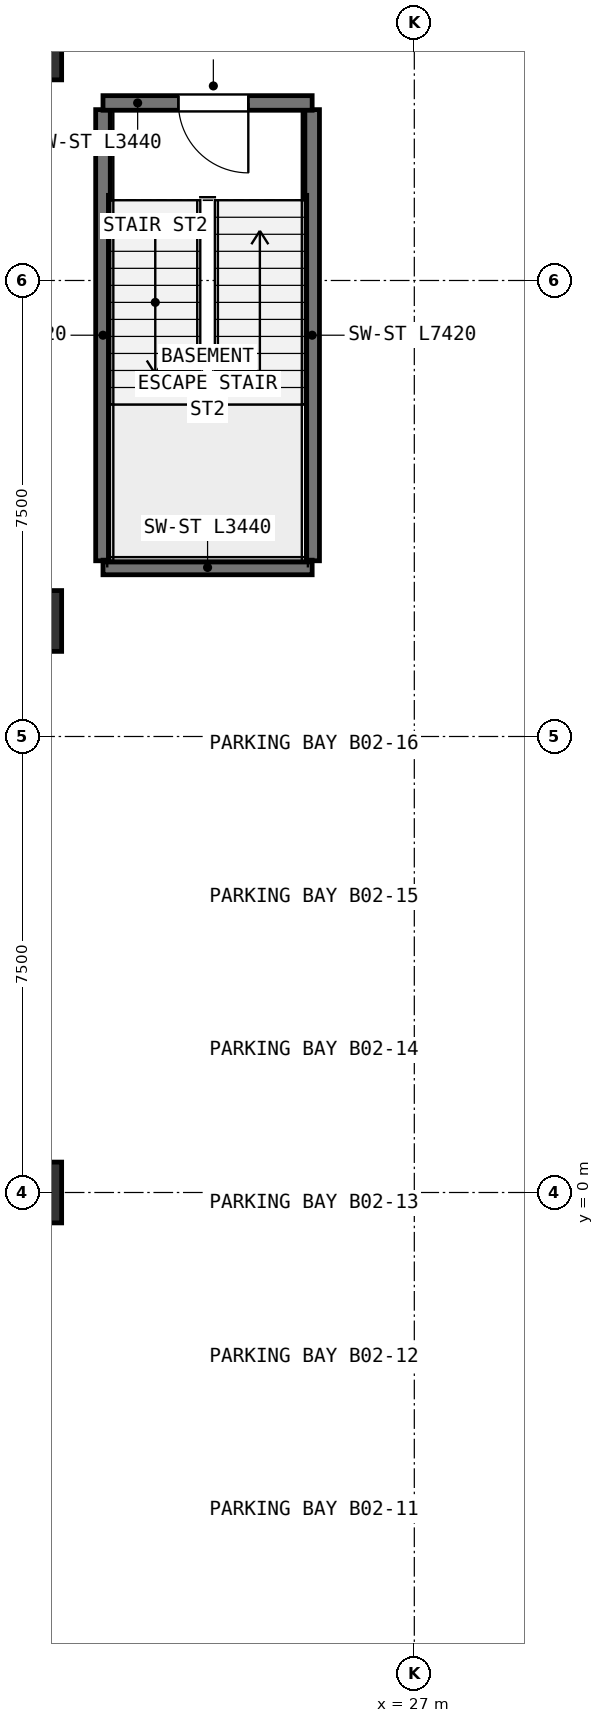
"""IFC4 building model, lengths in metres.
Left out: names, types, materials, properties, quantities, classifications, styles, units other than length and angle.
Written with IfcOpenShell. Run it as: python <this file> out.ifc"""

import sys

from ifc_helpers import new_model, si_unit, direction, frame, frame_2d, origin, origin_2d, place, context, subcontext, project, spatial, rectangle, extrude, element, fill, save


model = new_model("IFC4")
c1 = context("Model", 3, precision=1e-05, world=origin(), true_north=direction((0.0, 1.0)))
c2 = subcontext(c1, "Body", "Model", "MODEL_VIEW")
j1 = project(units=[si_unit("LENGTHUNIT", "METRE"), si_unit("PLANEANGLEUNIT", "RADIAN")], contexts=[c1])
p1 = place(None, origin())
s1 = spatial("IfcSite", under=j1, at=p1, CompositionType="ELEMENT")
p2 = place(p1, origin())
s2 = spatial("IfcBuilding", under=s1, at=p2, CompositionType="ELEMENT")
p3 = place(p2, frame((0.0, 0.0, -9.0)))
s3 = spatial("IfcBuildingStorey", under=s2, at=p3, CompositionType="ELEMENT", Elevation=-9.0)
p4 = place(p3, frame((20.35, -8.429, 0.0), z_axis=(0.0, 0.0, 1.0), x_axis=(-0.923879532511, 0.382683432365, 0.0)))
e1 = element("IfcColumn", 1, at=p4, inside=s3, PredefinedType="COLUMN", context=c2, shape_type="SweptSolid", body=[
    extrude(rectangle(XDim=1.8, YDim=2.2, at=origin_2d()), origin(), (0.0, 0.0, 1.0), 4.5),
])
for number, where, z_axis, x_axis in (
    (2, (20.8, 0.0, 0.0), (0.0, 0.0, 1.0), (1.0, 0.0, 0.0)),
    (3, (20.8, 9.4, 0.0), (0.0, 0.0, 1.0), (1.0, 0.0, 0.0)),
    (4, (20.8, 18.8, 0.0), (0.0, 0.0, 1.0), (1.0, 0.0, 0.0)),
):
    element("IfcColumn", number, at=place(p3, frame(where, z_axis=z_axis, x_axis=x_axis)), inside=s3, PredefinedType="COLUMN", context=c2, shape_type="SweptSolid", body=[
        extrude(rectangle(XDim=0.8, YDim=1.0, at=origin_2d()), origin(), (0.0, 0.0, 1.0), 4.5),
    ])
for number, where, z_axis, x_axis in (
    (5, (21.88, 10.39, 0.0), (0.0, 0.0, 1.0), (0.0, 1.0, 0.0)),
    (6, (25.32, 10.39, 0.0), (0.0, 0.0, 1.0), (0.0, 1.0, 0.0)),
):
    element("IfcWall", number, at=place(p3, frame(where, z_axis=z_axis, x_axis=x_axis)), inside=s3, PredefinedType="SHEAR", context=c2, shape_type="SweptSolid", body=[
        extrude(rectangle(XDim=7.42, YDim=0.24, at=frame_2d((3.71, 0.0))), origin(), (0.0, 0.0, 1.0), 4.2),
    ])
p5 = place(p3, frame((21.88, 10.28, 0.0), z_axis=(0.0, 0.0, 1.0), x_axis=(1.0, 0.0, 0.0)))
e7 = element("IfcWall", 7, at=p5, inside=s3, PredefinedType="SHEAR", context=c2, shape_type="SweptSolid", body=[
    extrude(rectangle(XDim=3.44, YDim=0.24, at=frame_2d((1.72, 0.0))), origin(), (0.0, 0.0, 1.0), 4.2),
])
p6 = place(p3, frame((25.32, 17.92, 0.0), z_axis=(0.0, 0.0, 1.0), x_axis=(-1.0, 0.0, 0.0)))
e8 = element("IfcWall", 8, at=p6, inside=s3, PredefinedType="SHEAR", context=c2, shape_type="SweptSolid", body=[
    extrude(rectangle(XDim=3.44, YDim=0.24, at=frame_2d((1.72, 0.0))), origin(), (0.0, 0.0, 1.0), 4.2),
])
p7 = place(p6, frame((1.05, 0.0, 0.0)))
e9 = element("IfcOpeningElement", 9, at=p7, cuts=e8, PredefinedType="OPENING", context=c2, shape_type="SweptSolid", body=[
    extrude(rectangle(XDim=1.15, YDim=2.15, at=frame_2d((0.575, 1.075))), frame((0.0, 0.13, 0.0), z_axis=(0.0, -1.0, 0.0), x_axis=(1.0, 0.0, 0.0)), (0.0, 0.0, 1.0), 0.26),
])
p8 = place(p7, origin())
e10 = element("IfcDoor", 10, at=p8, inside=s3, OperationType="SINGLE_SWING_LEFT", PredefinedType="DOOR", context=c2, shape_type="SweptSolid", body=[
    extrude(rectangle(XDim=1.15, YDim=2.15, at=frame_2d((0.575, 1.075))), frame((0.0, 0.025, 0.0), z_axis=(0.0, -1.0, 0.0), x_axis=(1.0, 0.0, 0.0)), (0.0, 0.0, 1.0), 0.05),
])
fill(e9, e10)
save(model, sys.argv[1])
